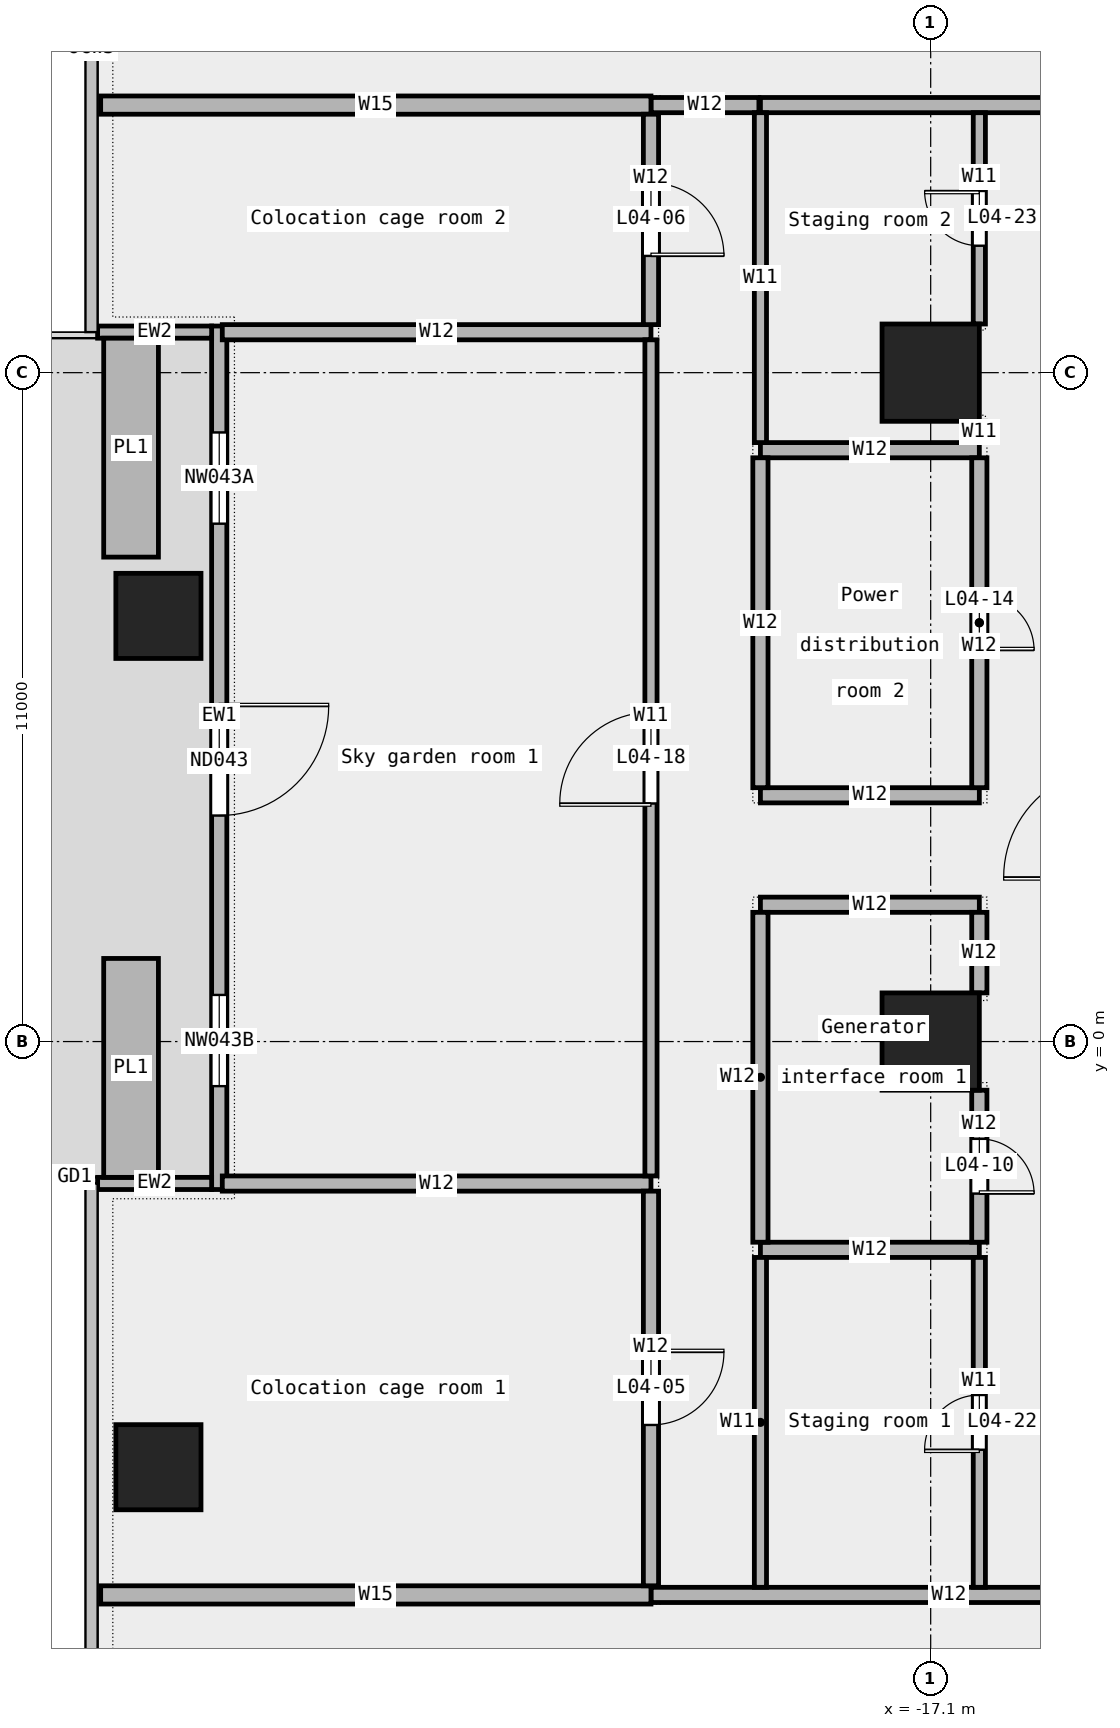
"""IFC4 building model, lengths in metres.
Left out: names, types, materials, properties, quantities, classifications, styles, units other than length and angle.
Written with IfcOpenShell. Run it as: python <this file> out.ifc"""

import sys

from ifc_helpers import new_model, si_unit, direction, frame, frame_2d, origin, origin_2d, place, context, subcontext, project, spatial, rectangle, extrude, element, fill, save


model = new_model("IFC4")
c1 = context("Model", 3, precision=1e-05, world=origin(), true_north=direction((0.0, 1.0)))
c2 = subcontext(c1, "Body", "Model", "MODEL_VIEW")
j1 = project(units=[si_unit("LENGTHUNIT", "METRE"), si_unit("PLANEANGLEUNIT", "RADIAN")], contexts=[c1])
p1 = place(None, origin())
s1 = spatial("IfcSite", under=j1, at=p1, CompositionType="ELEMENT")
p2 = place(p1, origin())
s2 = spatial("IfcBuilding", under=s1, at=p2, CompositionType="ELEMENT")
p3 = place(p2, frame((0.0, 0.0, 25.5)))
s3 = spatial("IfcBuildingStorey", under=s2, at=p3, CompositionType="ELEMENT", Elevation=25.5)
for number, where, z_axis, x_axis in (
    (1, (-29.8, 7.0, 0.0), (0.0, 0.0, 1.0), (1.0, 0.0, 0.0)),
    (2, (-29.8, -7.0, 0.0), (0.0, 0.0, 1.0), (1.0, 0.0, 0.0)),
):
    element("IfcColumn", number, at=place(p3, frame(where, z_axis=z_axis, x_axis=x_axis)), inside=s3, PredefinedType="COLUMN", context=c2, shape_type="SweptSolid", body=[
        extrude(rectangle(XDim=1.4, YDim=1.4, at=origin_2d()), origin(), (0.0, 0.0, 1.0), 5.05),
    ])
for number, where, z_axis, x_axis in (
    (3, (-17.1, 0.0, 0.0), (0.0, 0.0, 1.0), (1.0, 0.0, 0.0)),
    (4, (-17.1, 11.0, 0.0), (0.0, 0.0, 1.0), (1.0, 0.0, 0.0)),
):
    element("IfcColumn", number, at=place(p3, frame(where, z_axis=z_axis, x_axis=x_axis)), inside=s3, PredefinedType="COLUMN", context=c2, shape_type="SweptSolid", body=[
        extrude(rectangle(XDim=1.6, YDim=1.6, at=origin_2d()), origin(), (0.0, 0.0, 1.0), 5.05),
    ])
p4 = place(p3, frame((-28.8, 11.767, 0.0), z_axis=(0.0, 0.0, 1.0), x_axis=(0.0, -1.0, 0.0)))
e5 = element("IfcWall", 5, at=p4, inside=s3, PredefinedType="STANDARD", context=c2, shape_type="SweptSolid", body=[
    extrude(rectangle(XDim=14.2, YDim=0.25, at=frame_2d((7.1, 0.0))), origin(), (0.0, 0.0, 1.0), 5.05),
])
p5 = place(p4, frame((1.75, 0.0, 0.45)))
e6 = element("IfcOpeningElement", 6, at=p5, cuts=e5, PredefinedType="OPENING", context=c2, shape_type="SweptSolid", body=[
    extrude(rectangle(XDim=1.5, YDim=3.0, at=frame_2d((0.75, 1.5))), frame((0.0, 0.137, 0.0), z_axis=(0.0, -1.0, 0.0), x_axis=(1.0, 0.0, 0.0)), (0.0, 0.0, 1.0), 0.274),
])
p6 = place(p4, frame((6.25, 0.0, 0.0)))
e7 = element("IfcOpeningElement", 7, at=p6, cuts=e5, PredefinedType="OPENING", context=c2, shape_type="SweptSolid", body=[
    extrude(rectangle(XDim=1.8, YDim=2.4, at=frame_2d((0.9, 1.2))), frame((0.0, 0.137, 0.0), z_axis=(0.0, -1.0, 0.0), x_axis=(1.0, 0.0, 0.0)), (0.0, 0.0, 1.0), 0.274),
])
p7 = place(p4, frame((11.0, 0.0, 0.45)))
e8 = element("IfcOpeningElement", 8, at=p7, cuts=e5, PredefinedType="OPENING", context=c2, shape_type="SweptSolid", body=[
    extrude(rectangle(XDim=1.5, YDim=3.0, at=frame_2d((0.75, 1.5))), frame((0.0, 0.137, 0.0), z_axis=(0.0, -1.0, 0.0), x_axis=(1.0, 0.0, 0.0)), (0.0, 0.0, 1.0), 0.274),
])
for number, where, z_axis, x_axis in (
    (9, (-30.8, 11.667, 0.0), (0.0, 0.0, 1.0), (1.0, 0.0, 0.0)),
    (10, (-30.8, -2.333, 0.0), (0.0, 0.0, 1.0), (1.0, 0.0, 0.0)),
):
    element("IfcWall", number, at=place(p3, frame(where, z_axis=z_axis, x_axis=x_axis)), inside=s3, PredefinedType="STANDARD", context=c2, shape_type="SweptSolid", body=[
        extrude(rectangle(XDim=1.875, YDim=0.2, at=frame_2d((0.938, 0.0))), origin(), (0.0, 0.0, 1.0), 5.05),
    ])
for number, where, z_axis, x_axis in (
    (11, (-30.25, 11.567, 0.0), (0.0, 0.0, 1.0), (0.0, -1.0, 0.0)),
    (12, (-30.25, 1.367, 0.0), (0.0, 0.0, 1.0), (0.0, -1.0, 0.0)),
):
    element("IfcWall", number, at=place(p3, frame(where, z_axis=z_axis, x_axis=x_axis)), inside=s3, PredefinedType="STANDARD", context=c2, shape_type="SweptSolid", body=[
        extrude(rectangle(XDim=3.6, YDim=0.9, at=frame_2d((1.8, 0.0))), origin(), (0.0, 0.0, 1.0), 0.7),
    ])
p8 = place(p3, frame((-21.7, -9.1, 0.0), z_axis=(0.0, 0.0, 1.0), x_axis=(1.0, 0.0, 0.0)))
e13 = element("IfcWall", 13, at=p8, inside=s3, PredefinedType="PARTITIONING", context=c2, shape_type="SweptSolid", body=[
    extrude(rectangle(XDim=9.8, YDim=0.25, at=frame_2d((4.9, 0.0))), origin(), (0.0, 0.0, 1.0), 5.05),
])
p9 = place(p3, frame((-30.75, -9.1, 0.0), z_axis=(0.0, 0.0, 1.0), x_axis=(1.0, 0.0, 0.0)))
e14 = element("IfcWall", 14, at=p9, inside=s3, PredefinedType="PARTITIONING", context=c2, shape_type="SweptSolid", body=[
    extrude(rectangle(XDim=9.05, YDim=0.3, at=frame_2d((4.525, 0.0))), origin(), (0.0, 0.0, 1.0), 5.05),
])
p10 = place(p3, frame((-19.9, -3.425, 0.0), z_axis=(0.0, 0.0, 1.0), x_axis=(1.0, 0.0, 0.0)))
e15 = element("IfcWall", 15, at=p10, inside=s3, PredefinedType="PARTITIONING", context=c2, shape_type="SweptSolid", body=[
    extrude(rectangle(XDim=3.6, YDim=0.25, at=frame_2d((1.8, 0.0))), origin(), (0.0, 0.0, 1.0), 5.05),
])
p11 = place(p3, frame((-28.75, -2.335, 0.0), z_axis=(0.0, 0.0, 1.0), x_axis=(1.0, 0.0, 0.0)))
e16 = element("IfcWall", 16, at=p11, inside=s3, PredefinedType="PARTITIONING", context=c2, shape_type="SweptSolid", body=[
    extrude(rectangle(XDim=7.05, YDim=0.25, at=frame_2d((3.525, 0.0))), origin(), (0.0, 0.0, 1.0), 5.05),
])
for number, where, z_axis, x_axis in (
    (17, (-19.9, 2.25, 0.0), (0.0, 0.0, 1.0), (1.0, 0.0, 0.0)),
    (18, (-19.9, 4.05, 0.0), (0.0, 0.0, 1.0), (1.0, 0.0, 0.0)),
    (19, (-19.9, 9.725, 0.0), (0.0, 0.0, 1.0), (1.0, 0.0, 0.0)),
):
    element("IfcWall", number, at=place(p3, frame(where, z_axis=z_axis, x_axis=x_axis)), inside=s3, PredefinedType="PARTITIONING", context=c2, shape_type="SweptSolid", body=[
        extrude(rectangle(XDim=3.6, YDim=0.25, at=frame_2d((1.8, 0.0))), origin(), (0.0, 0.0, 1.0), 5.05),
    ])
p12 = place(p3, frame((-28.75, 11.665, 0.0), z_axis=(0.0, 0.0, 1.0), x_axis=(1.0, 0.0, 0.0)))
e20 = element("IfcWall", 20, at=p12, inside=s3, PredefinedType="PARTITIONING", context=c2, shape_type="SweptSolid", body=[
    extrude(rectangle(XDim=7.05, YDim=0.25, at=frame_2d((3.525, 0.0))), origin(), (0.0, 0.0, 1.0), 5.05),
])
p13 = place(p3, frame((-21.7, 15.4, 0.0), z_axis=(0.0, 0.0, 1.0), x_axis=(1.0, 0.0, 0.0)))
e21 = element("IfcWall", 21, at=p13, inside=s3, PredefinedType="PARTITIONING", context=c2, shape_type="SweptSolid", body=[
    extrude(rectangle(XDim=1.775, YDim=0.25, at=frame_2d((0.887, 0.0))), origin(), (0.0, 0.0, 1.0), 5.05),
])
p14 = place(p3, frame((-19.9, 15.4, 0.0), z_axis=(0.0, 0.0, 1.0), x_axis=(1.0, 0.0, 0.0)))
e22 = element("IfcWall", 22, at=p14, inside=s3, PredefinedType="PARTITIONING", context=c2, shape_type="SweptSolid", body=[
    extrude(rectangle(XDim=13.26, YDim=0.25, at=frame_2d((6.63, 0.0))), origin(), (0.0, 0.0, 1.0), 5.05),
])
p15 = place(p14, frame((7.53, 0.0, 0.0)))
e23 = element("IfcOpeningElement", 23, at=p15, cuts=e22, PredefinedType="OPENING", context=c2, shape_type="SweptSolid", body=[
    extrude(rectangle(XDim=1.8, YDim=2.1, at=frame_2d((0.9, 1.05))), frame((0.0, 0.137, 0.0), z_axis=(0.0, -1.0, 0.0), x_axis=(1.0, 0.0, 0.0)), (0.0, 0.0, 1.0), 0.274),
])
p16 = place(p3, frame((-30.75, 15.4, 0.0), z_axis=(0.0, 0.0, 1.0), x_axis=(1.0, 0.0, 0.0)))
e24 = element("IfcWall", 24, at=p16, inside=s3, PredefinedType="PARTITIONING", context=c2, shape_type="SweptSolid", body=[
    extrude(rectangle(XDim=9.05, YDim=0.3, at=frame_2d((4.525, 0.0))), origin(), (0.0, 0.0, 1.0), 5.05),
])
p17 = place(p3, frame((-21.7, -2.21, 0.0), z_axis=(0.0, 0.0, 1.0), x_axis=(0.0, 1.0, 0.0)))
e25 = element("IfcWall", 25, at=p17, inside=s3, PredefinedType="PARTITIONING", context=c2, shape_type="SweptSolid", body=[
    extrude(rectangle(XDim=13.75, YDim=0.2, at=frame_2d((6.875, 0.0))), origin(), (0.0, 0.0, 1.0), 5.05),
])
p18 = place(p17, frame((6.125, 0.0, 0.0)))
e26 = element("IfcOpeningElement", 26, at=p18, cuts=e25, PredefinedType="OPENING", context=c2, shape_type="SweptSolid", body=[
    extrude(rectangle(XDim=1.5, YDim=2.1, at=frame_2d((0.75, 1.05))), frame((0.0, 0.112, 0.0), z_axis=(0.0, -1.0, 0.0), x_axis=(1.0, 0.0, 0.0)), (0.0, 0.0, 1.0), 0.224),
])
p19 = place(p3, frame((-21.7, -8.95, 0.0), z_axis=(0.0, 0.0, 1.0), x_axis=(0.0, 1.0, 0.0)))
e27 = element("IfcWall", 27, at=p19, inside=s3, PredefinedType="PARTITIONING", context=c2, shape_type="SweptSolid", body=[
    extrude(rectangle(XDim=6.49, YDim=0.25, at=frame_2d((3.245, 0.0))), origin(), (0.0, 0.0, 1.0), 5.05),
])
p20 = place(p19, frame((2.645, 0.0, 0.0)))
e28 = element("IfcOpeningElement", 28, at=p20, cuts=e27, PredefinedType="OPENING", context=c2, shape_type="SweptSolid", body=[
    extrude(rectangle(XDim=1.2, YDim=2.1, at=frame_2d((0.6, 1.05))), frame((0.0, 0.137, 0.0), z_axis=(0.0, -1.0, 0.0), x_axis=(1.0, 0.0, 0.0)), (0.0, 0.0, 1.0), 0.274),
])
p21 = place(p3, frame((-21.7, 11.79, 0.0), z_axis=(0.0, 0.0, 1.0), x_axis=(0.0, 1.0, 0.0)))
e29 = element("IfcWall", 29, at=p21, inside=s3, PredefinedType="PARTITIONING", context=c2, shape_type="SweptSolid", body=[
    extrude(rectangle(XDim=3.46, YDim=0.25, at=frame_2d((1.73, 0.0))), origin(), (0.0, 0.0, 1.0), 5.05),
])
p22 = place(p21, frame((1.13, 0.0, 0.0)))
e30 = element("IfcOpeningElement", 30, at=p22, cuts=e29, PredefinedType="OPENING", context=c2, shape_type="SweptSolid", body=[
    extrude(rectangle(XDim=1.2, YDim=2.1, at=frame_2d((0.6, 1.05))), frame((0.0, 0.137, 0.0), z_axis=(0.0, -1.0, 0.0), x_axis=(1.0, 0.0, 0.0)), (0.0, 0.0, 1.0), 0.274),
])
p23 = place(p3, frame((-19.9, -8.975, 0.0), z_axis=(0.0, 0.0, 1.0), x_axis=(0.0, 1.0, 0.0)))
e31 = element("IfcWall", 31, at=p23, inside=s3, PredefinedType="PARTITIONING", context=c2, shape_type="SweptSolid", body=[
    extrude(rectangle(XDim=5.425, YDim=0.2, at=frame_2d((2.712, 0.0))), origin(), (0.0, 0.0, 1.0), 5.05),
])
p24 = place(p3, frame((-19.9, 9.85, 0.0), z_axis=(0.0, 0.0, 1.0), x_axis=(0.0, 1.0, 0.0)))
e32 = element("IfcWall", 32, at=p24, inside=s3, PredefinedType="PARTITIONING", context=c2, shape_type="SweptSolid", body=[
    extrude(rectangle(XDim=5.425, YDim=0.2, at=frame_2d((2.712, 0.0))), origin(), (0.0, 0.0, 1.0), 5.05),
])
for number, where, z_axis, x_axis in (
    (33, (-19.9, -3.3, 0.0), (0.0, 0.0, 1.0), (0.0, 1.0, 0.0)),
    (34, (-19.9, 4.175, 0.0), (0.0, 0.0, 1.0), (0.0, 1.0, 0.0)),
):
    element("IfcWall", number, at=place(p3, frame(where, z_axis=z_axis, x_axis=x_axis)), inside=s3, PredefinedType="PARTITIONING", context=c2, shape_type="SweptSolid", body=[
        extrude(rectangle(XDim=5.425, YDim=0.25, at=frame_2d((2.712, 0.0))), origin(), (0.0, 0.0, 1.0), 5.05),
    ])
p25 = place(p3, frame((-16.3, -8.975, 0.0), z_axis=(0.0, 0.0, 1.0), x_axis=(0.0, 1.0, 0.0)))
e35 = element("IfcWall", 35, at=p25, inside=s3, PredefinedType="PARTITIONING", context=c2, shape_type="SweptSolid", body=[
    extrude(rectangle(XDim=5.425, YDim=0.2, at=frame_2d((2.712, 0.0))), origin(), (0.0, 0.0, 1.0), 5.05),
])
p26 = place(p25, frame((2.262, 0.0, 0.0)))
e36 = element("IfcOpeningElement", 36, at=p26, cuts=e35, PredefinedType="OPENING", context=c2, shape_type="SweptSolid", body=[
    extrude(rectangle(XDim=0.9, YDim=2.1, at=frame_2d((0.45, 1.05))), frame((0.0, 0.112, 0.0), z_axis=(0.0, -1.0, 0.0), x_axis=(1.0, 0.0, 0.0)), (0.0, 0.0, 1.0), 0.224),
])
p27 = place(p3, frame((-16.3, 9.85, 0.0), z_axis=(0.0, 0.0, 1.0), x_axis=(0.0, 1.0, 0.0)))
e37 = element("IfcWall", 37, at=p27, inside=s3, PredefinedType="PARTITIONING", context=c2, shape_type="SweptSolid", body=[
    extrude(rectangle(XDim=0.35, YDim=0.2, at=frame_2d((0.175, 0.0))), origin(), (0.0, 0.0, 1.0), 5.05),
])
p28 = place(p3, frame((-16.3, 11.8, 0.0), z_axis=(0.0, 0.0, 1.0), x_axis=(0.0, 1.0, 0.0)))
e38 = element("IfcWall", 38, at=p28, inside=s3, PredefinedType="PARTITIONING", context=c2, shape_type="SweptSolid", body=[
    extrude(rectangle(XDim=3.475, YDim=0.2, at=frame_2d((1.737, 0.0))), origin(), (0.0, 0.0, 1.0), 5.05),
])
p29 = place(p28, frame((1.288, 0.0, 0.0)))
e39 = element("IfcOpeningElement", 39, at=p29, cuts=e38, PredefinedType="OPENING", context=c2, shape_type="SweptSolid", body=[
    extrude(rectangle(XDim=0.9, YDim=2.1, at=frame_2d((0.45, 1.05))), frame((0.0, 0.112, 0.0), z_axis=(0.0, -1.0, 0.0), x_axis=(1.0, 0.0, 0.0)), (0.0, 0.0, 1.0), 0.224),
])
p30 = place(p3, frame((-16.3, -3.3, 0.0), z_axis=(0.0, 0.0, 1.0), x_axis=(0.0, 1.0, 0.0)))
e40 = element("IfcWall", 40, at=p30, inside=s3, PredefinedType="PARTITIONING", context=c2, shape_type="SweptSolid", body=[
    extrude(rectangle(XDim=2.5, YDim=0.25, at=frame_2d((1.25, 0.0))), origin(), (0.0, 0.0, 1.0), 5.05),
])
p31 = place(p30, frame((0.8, 0.0, 0.0)))
e41 = element("IfcOpeningElement", 41, at=p31, cuts=e40, PredefinedType="OPENING", context=c2, shape_type="SweptSolid", body=[
    extrude(rectangle(XDim=0.9, YDim=2.1, at=frame_2d((0.45, 1.05))), frame((0.0, 0.137, 0.0), z_axis=(0.0, -1.0, 0.0), x_axis=(1.0, 0.0, 0.0)), (0.0, 0.0, 1.0), 0.274),
])
p32 = place(p3, frame((-16.3, 0.8, 0.0), z_axis=(0.0, 0.0, 1.0), x_axis=(0.0, 1.0, 0.0)))
e42 = element("IfcWall", 42, at=p32, inside=s3, PredefinedType="PARTITIONING", context=c2, shape_type="SweptSolid", body=[
    extrude(rectangle(XDim=1.325, YDim=0.25, at=frame_2d((0.663, 0.0))), origin(), (0.0, 0.0, 1.0), 5.05),
])
p33 = place(p3, frame((-16.3, 4.175, 0.0), z_axis=(0.0, 0.0, 1.0), x_axis=(0.0, 1.0, 0.0)))
e43 = element("IfcWall", 43, at=p33, inside=s3, PredefinedType="PARTITIONING", context=c2, shape_type="SweptSolid", body=[
    extrude(rectangle(XDim=5.425, YDim=0.25, at=frame_2d((2.712, 0.0))), origin(), (0.0, 0.0, 1.0), 5.05),
])
p34 = place(p33, frame((2.262, 0.0, 0.0)))
e44 = element("IfcOpeningElement", 44, at=p34, cuts=e43, PredefinedType="OPENING", context=c2, shape_type="SweptSolid", body=[
    extrude(rectangle(XDim=0.9, YDim=2.1, at=frame_2d((0.45, 1.05))), frame((0.0, 0.137, 0.0), z_axis=(0.0, -1.0, 0.0), x_axis=(1.0, 0.0, 0.0)), (0.0, 0.0, 1.0), 0.274),
])
p35 = place(p5, origin())
e45 = element("IfcWindow", 45, at=p35, inside=s3, PartitioningType="SINGLE_PANEL", PredefinedType="WINDOW", context=c2, shape_type="SweptSolid", body=[
    extrude(rectangle(XDim=1.5, YDim=3.0, at=frame_2d((0.75, 1.5))), frame((0.0, 0.03, 0.0), z_axis=(0.0, -1.0, 0.0), x_axis=(1.0, 0.0, 0.0)), (0.0, 0.0, 1.0), 0.06),
])
fill(e6, e45)
p36 = place(p6, origin())
e46 = element("IfcDoor", 46, at=p36, inside=s3, OperationType="DOUBLE_DOOR_SINGLE_SWING", PredefinedType="DOOR", context=c2, shape_type="SweptSolid", body=[
    extrude(rectangle(XDim=1.8, YDim=2.4, at=frame_2d((0.9, 1.2))), frame((0.0, 0.025, 0.0), z_axis=(0.0, -1.0, 0.0), x_axis=(1.0, 0.0, 0.0)), (0.0, 0.0, 1.0), 0.05),
])
fill(e7, e46)
p37 = place(p7, origin())
e47 = element("IfcWindow", 47, at=p37, inside=s3, PartitioningType="SINGLE_PANEL", PredefinedType="WINDOW", context=c2, shape_type="SweptSolid", body=[
    extrude(rectangle(XDim=1.5, YDim=3.0, at=frame_2d((0.75, 1.5))), frame((0.0, 0.03, 0.0), z_axis=(0.0, -1.0, 0.0), x_axis=(1.0, 0.0, 0.0)), (0.0, 0.0, 1.0), 0.06),
])
fill(e8, e47)
p38 = place(p20, origin())
e48 = element("IfcDoor", 48, at=p38, inside=s3, OperationType="SINGLE_SWING_LEFT", PredefinedType="DOOR", context=c2, shape_type="SweptSolid", body=[
    extrude(rectangle(XDim=1.2, YDim=2.1, at=frame_2d((0.6, 1.05))), frame((0.0, 0.025, 0.0), z_axis=(0.0, -1.0, 0.0), x_axis=(1.0, 0.0, 0.0)), (0.0, 0.0, 1.0), 0.05),
])
fill(e28, e48)
p39 = place(p22, origin())
e49 = element("IfcDoor", 49, at=p39, inside=s3, OperationType="SINGLE_SWING_RIGHT", PredefinedType="DOOR", context=c2, shape_type="SweptSolid", body=[
    extrude(rectangle(XDim=1.2, YDim=2.1, at=frame_2d((0.6, 1.05))), frame((0.0, 0.025, 0.0), z_axis=(0.0, -1.0, 0.0), x_axis=(1.0, 0.0, 0.0)), (0.0, 0.0, 1.0), 0.05),
])
fill(e30, e49)
p40 = place(p31, origin())
e50 = element("IfcDoor", 50, at=p40, inside=s3, OperationType="SINGLE_SWING_RIGHT", PredefinedType="DOOR", context=c2, shape_type="SweptSolid", body=[
    extrude(rectangle(XDim=0.9, YDim=2.1, at=frame_2d((0.45, 1.05))), frame((0.0, 0.025, 0.0), z_axis=(0.0, -1.0, 0.0), x_axis=(1.0, 0.0, 0.0)), (0.0, 0.0, 1.0), 0.05),
])
fill(e41, e50)
p41 = place(p34, origin())
e51 = element("IfcDoor", 51, at=p41, inside=s3, OperationType="SINGLE_SWING_RIGHT", PredefinedType="DOOR", context=c2, shape_type="SweptSolid", body=[
    extrude(rectangle(XDim=0.9, YDim=2.1, at=frame_2d((0.45, 1.05))), frame((0.0, 0.025, 0.0), z_axis=(0.0, -1.0, 0.0), x_axis=(1.0, 0.0, 0.0)), (0.0, 0.0, 1.0), 0.05),
])
fill(e44, e51)
p42 = place(p18, origin())
e52 = element("IfcDoor", 52, at=p42, inside=s3, OperationType="DOUBLE_DOOR_SINGLE_SWING", PredefinedType="DOOR", context=c2, shape_type="SweptSolid", body=[
    extrude(rectangle(XDim=1.5, YDim=2.1, at=frame_2d((0.75, 1.05))), frame((0.0, 0.025, 0.0), z_axis=(0.0, -1.0, 0.0), x_axis=(1.0, 0.0, 0.0)), (0.0, 0.0, 1.0), 0.05),
])
fill(e26, e52)
p43 = place(p26, origin())
e53 = element("IfcDoor", 53, at=p43, inside=s3, OperationType="SINGLE_SWING_LEFT", PredefinedType="DOOR", context=c2, shape_type="SweptSolid", body=[
    extrude(rectangle(XDim=0.9, YDim=2.1, at=frame_2d((0.45, 1.05))), frame((0.0, 0.025, 0.0), z_axis=(0.0, -1.0, 0.0), x_axis=(1.0, 0.0, 0.0)), (0.0, 0.0, 1.0), 0.05),
])
fill(e36, e53)
p44 = place(p29, origin())
e54 = element("IfcDoor", 54, at=p44, inside=s3, OperationType="SINGLE_SWING_RIGHT", PredefinedType="DOOR", context=c2, shape_type="SweptSolid", body=[
    extrude(rectangle(XDim=0.9, YDim=2.1, at=frame_2d((0.45, 1.05))), frame((0.0, 0.025, 0.0), z_axis=(0.0, -1.0, 0.0), x_axis=(1.0, 0.0, 0.0)), (0.0, 0.0, 1.0), 0.05),
])
fill(e39, e54)
save(model, sys.argv[1])
